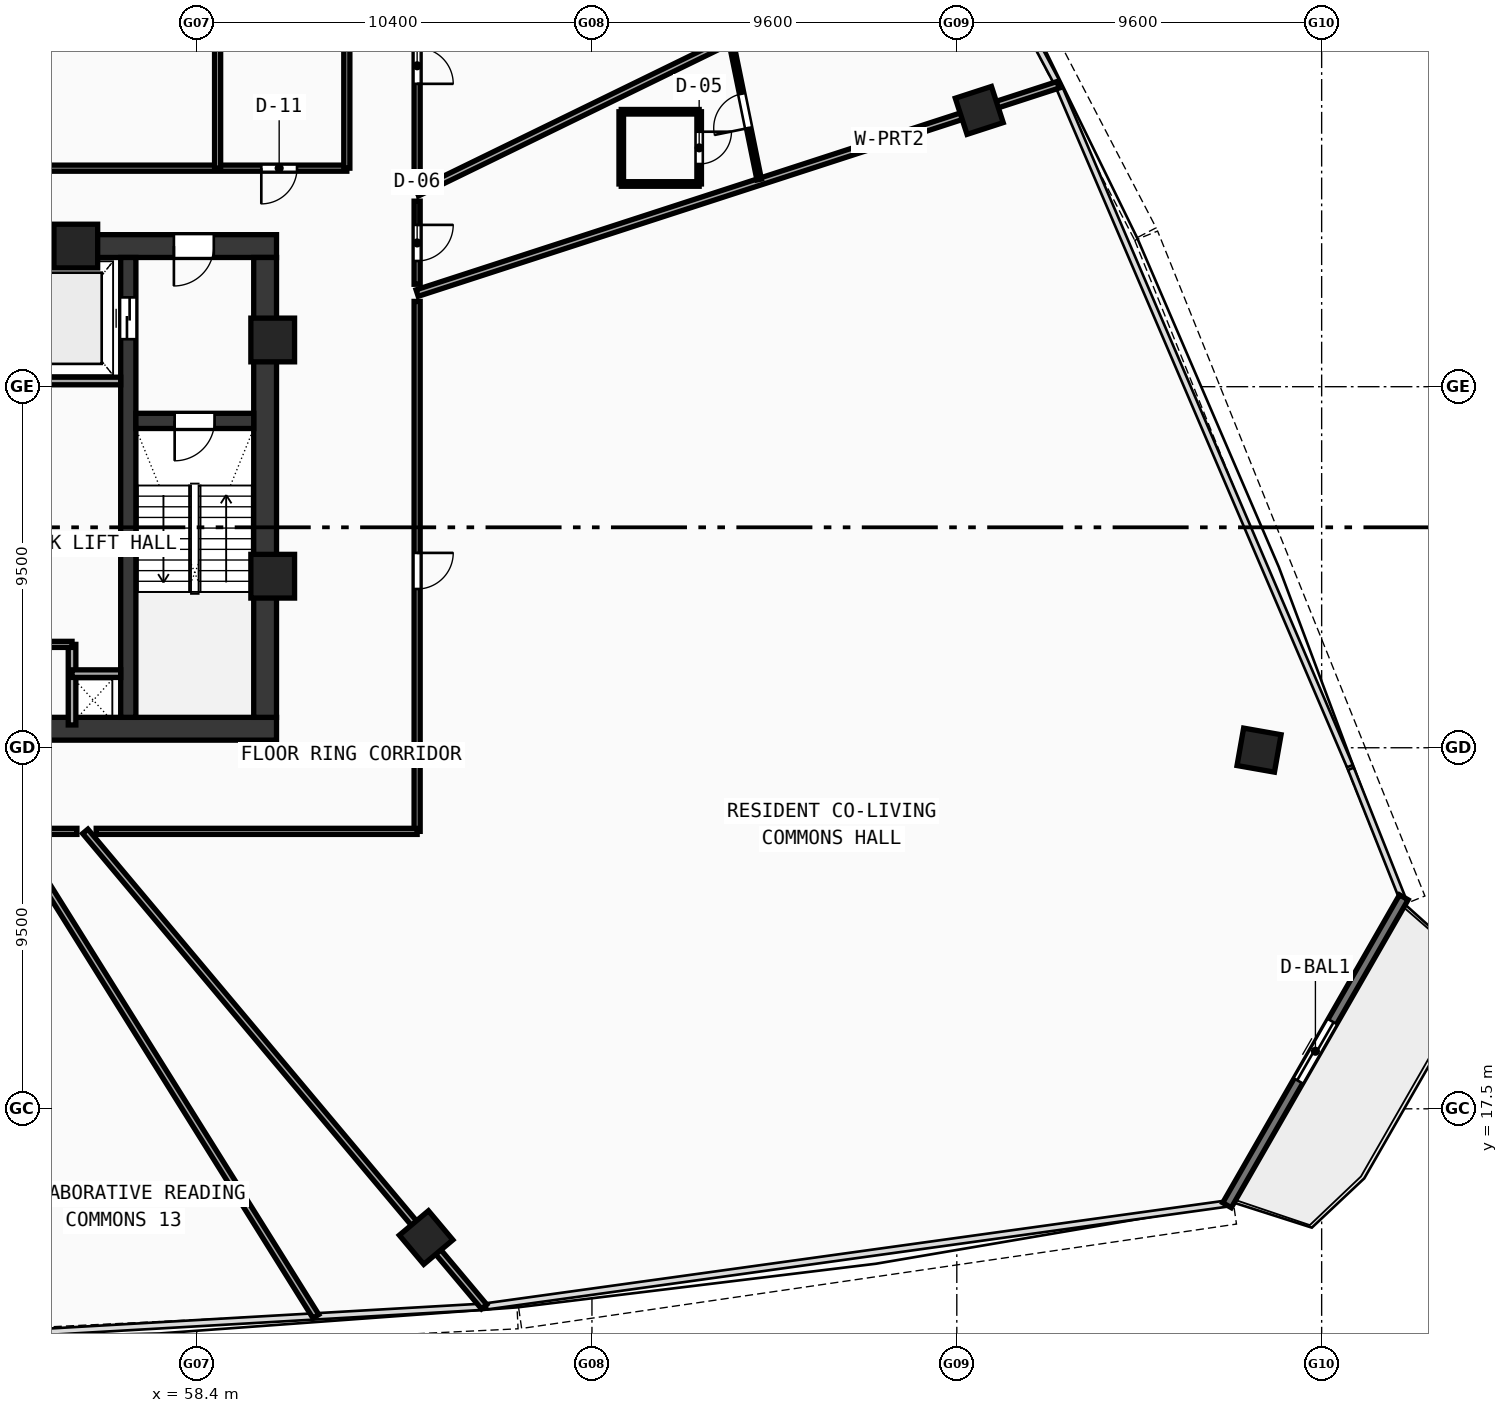
"""IFC4 building model, lengths in metres.
Left out: names, types, materials, properties, quantities, classifications, styles, units other than length and angle.
Written with IfcOpenShell. Run it as: python <this file> out.ifc"""

import sys

from ifc_helpers import new_model, si_unit, direction, frame, frame_2d, origin, origin_with_axes, origin_2d, place, context, subcontext, project, spatial, rectangle, hollow_rectangle, extrude, source, transform, mapped, element, fill, save


model = new_model("IFC4")
c1 = context("Model", 3, precision=1e-05, world=origin(), true_north=direction((0.0, 1.0)))
c2 = subcontext(c1, "Body", "Model", "MODEL_VIEW")
j1 = project(units=[si_unit("LENGTHUNIT", "METRE"), si_unit("PLANEANGLEUNIT", "RADIAN")], contexts=[c1])
p1 = place(None, origin())
s1 = spatial("IfcSite", under=j1, at=p1, CompositionType="ELEMENT")
p2 = place(p1, origin())
s2 = spatial("IfcBuilding", under=s1, at=p2, CompositionType="ELEMENT")
p3 = place(p2, frame((0.0, 0.0, 84.98)))
s3 = spatial("IfcBuildingStorey", under=s2, at=p3, CompositionType="ELEMENT", Elevation=84.98)
p4 = place(p3, frame((35.5, 27.5, 0.0), z_axis=(0.0, 0.0, 1.0), x_axis=(1.0, 0.0, 0.0)))
e1 = element("IfcWall", 1, at=p4, inside=s3, PredefinedType="SHEAR", context=c2, shape_type="SweptSolid", body=[
    extrude(rectangle(XDim=25.0, YDim=0.6, at=frame_2d((12.5, 0.0))), origin(), (0.0, 0.0, 1.0), 3.54),
])
p5 = place(p3, frame((49.2, 40.2, 0.0), z_axis=(0.0, 0.0, 1.0), x_axis=(1.0, 0.0, 0.0)))
e2 = element("IfcWall", 2, at=p5, inside=s3, PredefinedType="SHEAR", context=c2, shape_type="SweptSolid", body=[
    extrude(rectangle(XDim=11.3, YDim=0.6, at=frame_2d((5.65, 0.0))), origin(), (0.0, 0.0, 1.0), 3.54),
])
p6 = place(p5, frame((8.6, 0.0, 0.0)))
e3 = element("IfcOpeningElement", 3, at=p6, cuts=e2, PredefinedType="OPENING", context=c2, shape_type="SweptSolid", body=[
    extrude(rectangle(XDim=1.05, YDim=2.1, at=frame_2d((0.525, 1.05))), frame((0.0, 0.31, 0.0), z_axis=(0.0, -1.0, 0.0), x_axis=(1.0, 0.0, 0.0)), (0.0, 0.0, 1.0), 0.62),
])
p7 = place(p3, frame((60.2, 27.8, 0.0), z_axis=(0.0, 0.0, 1.0), x_axis=(0.0, 1.0, 0.0)))
e4 = element("IfcWall", 4, at=p7, inside=s3, PredefinedType="SHEAR", context=c2, shape_type="SweptSolid", body=[
    extrude(rectangle(XDim=12.1, YDim=0.6, at=frame_2d((6.05, 0.0))), origin(), (0.0, 0.0, 1.0), 3.54),
])
p8 = place(p3, frame((56.6, 27.8, 0.0), z_axis=(0.0, 0.0, 1.0), x_axis=(0.0, 1.0, 0.0)))
e5 = element("IfcWall", 5, at=p8, inside=s3, PredefinedType="SHEAR", context=c2, shape_type="SweptSolid", body=[
    extrude(rectangle(XDim=12.1, YDim=0.4, at=frame_2d((6.05, 0.0))), origin(), (0.0, 0.0, 1.0), 3.54),
])
p9 = place(p8, frame((9.95, 0.0, 0.0)))
e6 = element("IfcOpeningElement", 6, at=p9, cuts=e5, PredefinedType="OPENING", context=c2, shape_type="SweptSolid", body=[
    extrude(rectangle(XDim=1.1, YDim=2.1, at=frame_2d((0.55, 1.05))), frame((0.0, 0.21, 0.0), z_axis=(0.0, -1.0, 0.0), x_axis=(1.0, 0.0, 0.0)), (0.0, 0.0, 1.0), 0.42),
])
p10 = place(p3, frame((56.8, 35.6, 0.0), z_axis=(0.0, 0.0, 1.0), x_axis=(1.0, 0.0, 0.0)))
e7 = element("IfcWall", 7, at=p10, inside=s3, PredefinedType="SHEAR", context=c2, shape_type="SweptSolid", body=[
    extrude(rectangle(XDim=3.1, YDim=0.4, at=frame_2d((1.55, 0.0))), origin(), (0.0, 0.0, 1.0), 3.54),
])
p11 = place(p10, frame((1.02, 0.0, 0.0)))
e8 = element("IfcOpeningElement", 8, at=p11, cuts=e7, PredefinedType="OPENING", context=c2, shape_type="SweptSolid", body=[
    extrude(rectangle(XDim=1.05, YDim=2.1, at=frame_2d((0.525, 1.05))), frame((0.0, 0.21, 0.0), z_axis=(0.0, -1.0, 0.0), x_axis=(1.0, 0.0, 0.0)), (0.0, 0.0, 1.0), 0.42),
])
m1 = source(origin(), c2, "Body", "SweptSolid", [
    extrude(hollow_rectangle(XDim=1.15, YDim=1.15, WallThickness=0.048, at=origin_2d()), origin(), (0.0, 0.0, 1.0), 3.8),
])
for number, where, z_axis, x_axis in (
    (9, (60.4, 31.513, -0.26), (0.0, 0.0, 1.0), (1.0, 0.0, 0.0)),
    (10, (60.4, 37.729, -0.26), (0.0, 0.0, 1.0), (1.0, 0.0, 0.0)),
    (11, (55.219, 40.2, -0.26), (0.0, 0.0, 1.0), (1.0, 0.0, 0.0)),
):
    element("IfcColumn", number, at=place(p3, frame(where, z_axis=z_axis, x_axis=x_axis)), inside=s3, PredefinedType="COLUMN", context=c2, shape_type="MappedRepresentation", body=[
        mapped(m1, transform((0.0, 0.0, 0.0), scale=1.0)),
    ])
m2 = source(origin(), c2, "Body", "SweptSolid", [
    extrude(hollow_rectangle(XDim=1.0, YDim=1.0, WallThickness=0.042, at=origin_2d()), origin(), (0.0, 0.0, 1.0), 3.8),
])
for number, where, z_axis, x_axis in (
    (12, (64.436, 14.112, -0.26), (0.0, 0.0, 1.0), (0.766, 0.643, 0.0)),
    (13, (86.353, 26.938, -0.26), (0.0, 0.0, 1.0), (0.174, 0.985, 0.0)),
    (14, (78.991, 43.77, -0.26), (0.0, 0.0, 1.0), (-0.309, 0.951, 0.0)),
):
    element("IfcColumn", number, at=place(p3, frame(where, z_axis=z_axis, x_axis=x_axis)), inside=s3, PredefinedType="COLUMN", context=c2, shape_type="MappedRepresentation", body=[
        mapped(m2, transform((0.0, 0.0, 0.0), scale=1.0)),
    ])
p12 = place(p3, frame((85.51, 14.963, 0.0), z_axis=(0.0, 0.0, 1.0), x_axis=(0.497922114025, 0.867221752705, 0.0)))
e15 = element("IfcWall", 15, at=p12, inside=s3, PredefinedType="STANDARD", context=c2, shape_type="SweptSolid", body=[
    extrude(rectangle(XDim=9.343, YDim=0.26, at=frame_2d((4.671, 0.0))), origin(), (0.0, 0.0, 1.0), 3.54),
])
p13 = place(p12, frame((3.771, 0.0, 0.0)))
e16 = element("IfcOpeningElement", 16, at=p13, cuts=e15, PredefinedType="OPENING", context=c2, shape_type="SweptSolid", body=[
    extrude(rectangle(XDim=1.8, YDim=2.15, at=frame_2d((0.9, 1.075))), frame((0.0, 0.14, 0.0), z_axis=(0.0, -1.0, 0.0), x_axis=(1.0, 0.0, 0.0)), (0.0, 0.0, 1.0), 0.28),
])
p14 = place(p3, frame((53.68, 36.65, 0.0), z_axis=(0.0, 0.0, 1.0), x_axis=(1.0, 0.0, 0.0)))
e17 = element("IfcWall", 17, at=p14, inside=s3, PredefinedType="SOLIDWALL", context=c2, shape_type="SweptSolid", body=[
    extrude(rectangle(XDim=2.72, YDim=0.2, at=frame_2d((1.36, 0.0))), origin(), (0.0, 0.0, 1.0), 3.54),
])
p15 = place(p3, frame((55.12, 27.6, 0.0), z_axis=(0.0, 0.0, 1.0), x_axis=(0.0, 1.0, 0.0)))
e18 = element("IfcWall", 18, at=p15, inside=s3, PredefinedType="SOLIDWALL", context=c2, shape_type="SweptSolid", body=[
    extrude(rectangle(XDim=2.12, YDim=0.2, at=frame_2d((1.06, 0.0))), origin(), (0.0, 0.0, 1.0), 3.54),
])
p16 = place(p3, frame((55.12, 28.95, 0.0), z_axis=(0.0, 0.0, 1.0), x_axis=(1.0, 0.0, 0.0)))
e19 = element("IfcWall", 19, at=p16, inside=s3, PredefinedType="SOLIDWALL", context=c2, shape_type="SweptSolid", body=[
    extrude(rectangle(XDim=1.28, YDim=0.2, at=frame_2d((0.64, 0.0))), origin(), (0.0, 0.0, 1.0), 3.54),
])
p17 = place(p3, frame((51.05, 29.72, 0.0), z_axis=(0.0, 0.0, 1.0), x_axis=(1.0, 0.0, 0.0)))
e20 = element("IfcWall", 20, at=p17, inside=s3, PredefinedType="PARTITIONING", context=c2, shape_type="SweptSolid", body=[
    extrude(rectangle(XDim=4.07, YDim=0.16, at=frame_2d((2.035, 0.0))), origin(), (0.0, 0.0, 1.0), 3.54),
])
p18 = place(p17, frame((0.5, 0.0, 0.0)))
e21 = element("IfcOpeningElement", 21, at=p18, cuts=e20, PredefinedType="OPENING", context=c2, shape_type="SweptSolid", body=[
    extrude(rectangle(XDim=0.9, YDim=2.1, at=frame_2d((0.45, 1.05))), frame((0.0, 0.09, 0.0), z_axis=(0.0, -1.0, 0.0), x_axis=(1.0, 0.0, 0.0)), (0.0, 0.0, 1.0), 0.18),
])
p19 = place(p3, frame((45.92, 42.25, 0.0), z_axis=(0.0, 0.0, 1.0), x_axis=(1.0, 0.0, 0.0)))
e22 = element("IfcWall", 22, at=p19, inside=s3, PredefinedType="PARTITIONING", context=c2, shape_type="SweptSolid", body=[
    extrude(rectangle(XDim=16.43, YDim=0.16, at=frame_2d((8.215, 0.0))), origin(), (0.0, 0.0, 1.0), 2.84),
])
p20 = place(p19, frame((2.1, 0.0, 0.0)))
e23 = element("IfcOpeningElement", 23, at=p20, cuts=e22, PredefinedType="OPENING", context=c2, shape_type="SweptSolid", body=[
    extrude(rectangle(XDim=0.92, YDim=2.1, at=frame_2d((0.46, 1.05))), frame((0.0, 0.09, 0.0), z_axis=(0.0, -1.0, 0.0), x_axis=(1.0, 0.0, 0.0)), (0.0, 0.0, 1.0), 0.18),
])
p21 = place(p19, frame((14.18, 0.0, 0.0)))
e24 = element("IfcOpeningElement", 24, at=p21, cuts=e22, PredefinedType="OPENING", context=c2, shape_type="SweptSolid", body=[
    extrude(rectangle(XDim=0.94, YDim=2.1, at=frame_2d((0.47, 1.05))), frame((0.0, 0.09, 0.0), z_axis=(0.0, -1.0, 0.0), x_axis=(1.0, 0.0, 0.0)), (0.0, 0.0, 1.0), 0.18),
])
p22 = place(p3, frame((62.35, 42.25, 0.0), z_axis=(0.0, 0.0, 1.0), x_axis=(0.0, 1.0, 0.0)))
e25 = element("IfcWall", 25, at=p22, inside=s3, PredefinedType="PARTITIONING", context=c2, shape_type="SweptSolid", body=[
    extrude(rectangle(XDim=7.55, YDim=0.16, at=frame_2d((3.775, 0.0))), origin(), (0.0, 0.0, 1.0), 2.84),
])
p23 = place(p3, frame((58.95, 42.25, 0.0), z_axis=(0.0, 0.0, 1.0), x_axis=(0.0, 1.0, 0.0)))
e26 = element("IfcWall", 26, at=p23, inside=s3, PredefinedType="PARTITIONING", context=c2, shape_type="SweptSolid", body=[
    extrude(rectangle(XDim=4.35, YDim=0.16, at=frame_2d((2.175, 0.0))), origin(), (0.0, 0.0, 1.0), 2.84),
])
p24 = place(p3, frame((64.2, 38.964, 0.0), z_axis=(0.0, 0.0, 1.0), x_axis=(0.951054301474, 0.309023810812, 0.0)))
e27 = element("IfcWall", 27, at=p24, inside=s3, PredefinedType="PARTITIONING", context=c2, shape_type="SweptSolid", body=[
    extrude(rectangle(XDim=17.733, YDim=0.18, at=frame_2d((8.867, 0.0))), origin(), (0.0, 0.0, 1.0), 2.84),
])
p25 = place(p3, frame((64.2, 41.601, 0.0), z_axis=(0.0, 0.0, 1.0), x_axis=(0.898796049991, 0.438367038588, 0.0)))
e28 = element("IfcWall", 28, at=p25, inside=s3, PredefinedType="PARTITIONING", context=c2, shape_type="SweptSolid", body=[
    extrude(rectangle(XDim=16.234, YDim=0.18, at=frame_2d((8.117, 0.0))), origin(), (0.0, 0.0, 1.0), 2.84),
])
p26 = place(p3, frame((53.561, 24.8, 0.0), z_axis=(0.0, 0.0, 1.0), x_axis=(0.529927477017, -0.848042964184, 0.0)))
e29 = element("IfcWall", 29, at=p26, inside=s3, PredefinedType="PARTITIONING", context=c2, shape_type="SweptSolid", body=[
    extrude(rectangle(XDim=15.048, YDim=0.18, at=frame_2d((7.524, 0.0))), origin(), (0.0, 0.0, 1.0), 2.84),
])
p27 = place(p3, frame((55.468, 24.8, 0.0), z_axis=(0.0, 0.0, 1.0), x_axis=(0.642790086939, -0.76604236445, 0.0)))
e30 = element("IfcWall", 30, at=p27, inside=s3, PredefinedType="PARTITIONING", context=c2, shape_type="SweptSolid", body=[
    extrude(rectangle(XDim=16.326, YDim=0.18, at=frame_2d((8.163, 0.0))), origin(), (0.0, 0.0, 1.0), 2.84),
])
p28 = place(p3, frame((64.2, 48.067, 0.0), z_axis=(0.0, 0.0, 1.0), x_axis=(0.0, -1.0, 0.0)))
e31 = element("IfcWall", 31, at=p28, inside=s3, PredefinedType="PARTITIONING", context=c2, shape_type="SweptSolid", body=[
    extrude(rectangle(XDim=6.221, YDim=0.16, at=frame_2d((3.11, 0.0))), origin(), (0.0, 0.0, 1.0), 2.84),
])
p29 = place(p28, frame((2.648, 0.0, 0.0)))
e32 = element("IfcOpeningElement", 32, at=p29, cuts=e31, PredefinedType="OPENING", context=c2, shape_type="SweptSolid", body=[
    extrude(rectangle(XDim=0.95, YDim=2.1, at=frame_2d((0.475, 1.05))), frame((0.0, 0.09, 0.0), z_axis=(0.0, -1.0, 0.0), x_axis=(1.0, 0.0, 0.0)), (0.0, 0.0, 1.0), 0.18),
])
p30 = place(p3, frame((64.2, 41.382, 0.0), z_axis=(0.0, 0.0, 1.0), x_axis=(0.0, -1.0, 0.0)))
e33 = element("IfcWall", 33, at=p30, inside=s3, PredefinedType="PARTITIONING", context=c2, shape_type="SweptSolid", body=[
    extrude(rectangle(XDim=2.187, YDim=0.16, at=frame_2d((1.093, 0.0))), origin(), (0.0, 0.0, 1.0), 3.54),
])
p31 = place(p30, frame((0.624, 0.0, 0.0)))
e34 = element("IfcOpeningElement", 34, at=p31, cuts=e33, PredefinedType="OPENING", context=c2, shape_type="SweptSolid", body=[
    extrude(rectangle(XDim=0.95, YDim=2.1, at=frame_2d((0.475, 1.05))), frame((0.0, 0.09, 0.0), z_axis=(0.0, -1.0, 0.0), x_axis=(1.0, 0.0, 0.0)), (0.0, 0.0, 1.0), 0.18),
])
p32 = place(p3, frame((64.2, 38.744, 0.0), z_axis=(0.0, 0.0, 1.0), x_axis=(0.0, -1.0, 0.0)))
e35 = element("IfcWall", 35, at=p32, inside=s3, PredefinedType="PARTITIONING", context=c2, shape_type="SweptSolid", body=[
    extrude(rectangle(XDim=13.944, YDim=0.16, at=frame_2d((6.972, 0.0))), origin(), (0.0, 0.0, 1.0), 2.84),
])
p33 = place(p32, frame((6.617, 0.0, 0.0)))
e36 = element("IfcOpeningElement", 36, at=p33, cuts=e35, PredefinedType="OPENING", context=c2, shape_type="SweptSolid", body=[
    extrude(rectangle(XDim=0.95, YDim=2.1, at=frame_2d((0.475, 1.05))), frame((0.0, 0.09, 0.0), z_axis=(0.0, -1.0, 0.0), x_axis=(1.0, 0.0, 0.0)), (0.0, 0.0, 1.0), 0.18),
])
p34 = place(p3, frame((64.2, 24.8, 0.0), z_axis=(0.0, 0.0, 1.0), x_axis=(-1.0, 0.0, 0.0)))
e37 = element("IfcWall", 37, at=p34, inside=s3, PredefinedType="PARTITIONING", context=c2, shape_type="SweptSolid", body=[
    extrude(rectangle(XDim=8.445, YDim=0.16, at=frame_2d((4.222, 0.0))), origin(), (0.0, 0.0, 1.0), 3.14),
])
p35 = place(p3, frame((55.248, 24.8, 0.0), z_axis=(0.0, 0.0, 1.0), x_axis=(-1.0, 0.0, 0.0)))
e38 = element("IfcWall", 38, at=p35, inside=s3, PredefinedType="PARTITIONING", context=c2, shape_type="SweptSolid", body=[
    extrude(rectangle(XDim=1.427, YDim=0.16, at=frame_2d((0.714, 0.0))), origin(), (0.0, 0.0, 1.0), 2.84),
])
p36 = place(p3, frame((69.571, 41.834, 0.0), z_axis=(0.0, 0.0, 1.0), x_axis=(1.0, 0.0, 0.0)))
e39 = element("IfcWall", 39, at=p36, inside=s3, PredefinedType="PARTITIONING", context=c2, shape_type="SweptSolid", body=[
    extrude(rectangle(XDim=2.05, YDim=0.12, at=frame_2d((1.025, 0.0))), origin(), (0.0, 0.0, 1.0), 3.54),
])
p37 = place(p3, frame((71.621, 41.834, 0.0), z_axis=(0.0, 0.0, 1.0), x_axis=(0.0, 1.0, 0.0)))
e40 = element("IfcWall", 40, at=p37, inside=s3, PredefinedType="PARTITIONING", context=c2, shape_type="SweptSolid", body=[
    extrude(rectangle(XDim=1.9, YDim=0.12, at=frame_2d((0.95, 0.0))), origin(), (0.0, 0.0, 1.0), 3.14),
])
p38 = place(p37, frame((0.525, 0.0, 0.0)))
e41 = element("IfcOpeningElement", 41, at=p38, cuts=e40, PredefinedType="OPENING", context=c2, shape_type="SweptSolid", body=[
    extrude(rectangle(XDim=0.85, YDim=2.1, at=frame_2d((0.425, 1.05))), frame((0.0, 0.07, 0.0), z_axis=(0.0, -1.0, 0.0), x_axis=(1.0, 0.0, 0.0)), (0.0, 0.0, 1.0), 0.14),
])
p39 = place(p3, frame((71.621, 43.734, 0.0), z_axis=(0.0, 0.0, 1.0), x_axis=(-1.0, 0.0, 0.0)))
e42 = element("IfcWall", 42, at=p39, inside=s3, PredefinedType="PARTITIONING", context=c2, shape_type="SweptSolid", body=[
    extrude(rectangle(XDim=2.05, YDim=0.12, at=frame_2d((1.025, 0.0))), origin(), (0.0, 0.0, 1.0), 3.54),
])
p40 = place(p3, frame((69.571, 43.734, 0.0), z_axis=(0.0, 0.0, 1.0), x_axis=(0.0, -1.0, 0.0)))
e43 = element("IfcWall", 43, at=p40, inside=s3, PredefinedType="PARTITIONING", context=c2, shape_type="SweptSolid", body=[
    extrude(rectangle(XDim=1.9, YDim=0.12, at=frame_2d((0.95, 0.0))), origin(), (0.0, 0.0, 1.0), 3.54),
])
p41 = place(p3, frame((73.2, 41.951, 0.0), z_axis=(0.0, 0.0, 1.0), x_axis=(-0.199717476268, 0.979853524601, 0.0)))
e44 = element("IfcWall", 44, at=p41, inside=s3, PredefinedType="PARTITIONING", context=c2, shape_type="SweptSolid", body=[
    extrude(rectangle(XDim=3.688, YDim=0.12, at=frame_2d((1.844, 0.0))), origin(), (0.0, 0.0, 1.0), 2.84),
])
p42 = place(p41, frame((1.384, 0.0, 0.0)))
e45 = element("IfcOpeningElement", 45, at=p42, cuts=e44, PredefinedType="OPENING", context=c2, shape_type="SweptSolid", body=[
    extrude(rectangle(XDim=0.92, YDim=2.1, at=frame_2d((0.46, 1.05))), frame((0.0, 0.07, 0.0), z_axis=(0.0, -1.0, 0.0), x_axis=(1.0, 0.0, 0.0)), (0.0, 0.0, 1.0), 0.14),
])
m3 = source(origin(), c2, "Body", "SweptSolid", [
    extrude(rectangle(XDim=1.8, YDim=2.15, at=frame_2d((0.9, 1.075))), frame((0.0, 0.025, 0.0), z_axis=(0.0, -1.0, 0.0), x_axis=(1.0, 0.0, 0.0)), (0.0, 0.0, 1.0), 0.05),
])
p43 = place(p13, origin_with_axes())
e46 = element("IfcDoor", 46, at=p43, inside=s3, OperationType="DOUBLE_DOOR_SLIDING", PredefinedType="DOOR", context=c2, shape_type="MappedRepresentation", body=[
    mapped(m3, transform((0.0, 0.0, 0.0), scale=1.0)),
])
fill(e16, e46)
m4 = source(origin(), c2, "Body", "SweptSolid", [
    extrude(rectangle(XDim=1.05, YDim=2.1, at=frame_2d((0.525, 1.05))), frame((0.0, 0.025, 0.0), z_axis=(0.0, -1.0, 0.0), x_axis=(1.0, 0.0, 0.0)), (0.0, 0.0, 1.0), 0.05),
])
p44 = place(p11, frame((1.05, 0.0, 0.0), z_axis=(0.0, 0.0, 1.0), x_axis=(-1.0, 0.0, 0.0)))
e47 = element("IfcDoor", 47, at=p44, inside=s3, OperationType="SINGLE_SWING_RIGHT", PredefinedType="DOOR", context=c2, shape_type="MappedRepresentation", body=[
    mapped(m4, transform((0.0, 0.0, 0.0), scale=1.0)),
])
fill(e8, e47)
p45 = place(p6, frame((1.05, 0.0, 0.0), z_axis=(0.0, 0.0, 1.0), x_axis=(-1.0, 0.0, 0.0)))
e48 = element("IfcDoor", 48, at=p45, inside=s3, OperationType="SINGLE_SWING_RIGHT", PredefinedType="DOOR", context=c2, shape_type="MappedRepresentation", body=[
    mapped(m4, transform((0.0, 0.0, 0.0), scale=1.0)),
])
fill(e3, e48)
m5 = source(origin(), c2, "Body", "SweptSolid", [
    extrude(rectangle(XDim=1.1, YDim=2.1, at=frame_2d((0.55, 1.05))), frame((0.0, 0.025, 0.0), z_axis=(0.0, -1.0, 0.0), x_axis=(1.0, 0.0, 0.0)), (0.0, 0.0, 1.0), 0.05),
])
p46 = place(p9, origin_with_axes())
e49 = element("IfcDoor", 49, at=p46, inside=s3, OperationType="DOUBLE_DOOR_SLIDING", PredefinedType="DOOR", context=c2, shape_type="MappedRepresentation", body=[
    mapped(m5, transform((0.0, 0.0, 0.0), scale=1.0)),
])
fill(e6, e49)
m6 = source(origin(), c2, "Body", "SweptSolid", [
    extrude(rectangle(XDim=0.94, YDim=2.1, at=frame_2d((0.47, 1.05))), frame((0.0, 0.025, 0.0), z_axis=(0.0, -1.0, 0.0), x_axis=(1.0, 0.0, 0.0)), (0.0, 0.0, 1.0), 0.05),
])
p47 = place(p21, frame((0.94, 0.0, 0.0), z_axis=(0.0, 0.0, 1.0), x_axis=(-1.0, 0.0, 0.0)))
e50 = element("IfcDoor", 50, at=p47, inside=s3, OperationType="SINGLE_SWING_RIGHT", PredefinedType="DOOR", context=c2, shape_type="MappedRepresentation", body=[
    mapped(m6, transform((0.0, 0.0, 0.0), scale=1.0)),
])
fill(e24, e50)
m7 = source(origin(), c2, "Body", "SweptSolid", [
    extrude(rectangle(XDim=0.95, YDim=2.1, at=frame_2d((0.475, 1.05))), frame((0.0, 0.025, 0.0), z_axis=(0.0, -1.0, 0.0), x_axis=(1.0, 0.0, 0.0)), (0.0, 0.0, 1.0), 0.05),
])
p48 = place(p31, origin_with_axes())
e51 = element("IfcDoor", 51, at=p48, inside=s3, OperationType="SINGLE_SWING_LEFT", PredefinedType="DOOR", context=c2, shape_type="MappedRepresentation", body=[
    mapped(m7, transform((0.0, 0.0, 0.0), scale=1.0)),
])
fill(e34, e51)
m8 = source(origin(), c2, "Body", "SweptSolid", [
    extrude(rectangle(XDim=0.85, YDim=2.1, at=frame_2d((0.425, 1.05))), frame((0.0, 0.025, 0.0), z_axis=(0.0, -1.0, 0.0), x_axis=(1.0, 0.0, 0.0)), (0.0, 0.0, 1.0), 0.05),
])
p49 = place(p38, frame((0.85, 0.0, 0.0), z_axis=(0.0, 0.0, 1.0), x_axis=(-1.0, 0.0, 0.0)))
e52 = element("IfcDoor", 52, at=p49, inside=s3, OperationType="SINGLE_SWING_LEFT", PredefinedType="DOOR", context=c2, shape_type="MappedRepresentation", body=[
    mapped(m8, transform((0.0, 0.0, 0.0), scale=1.0)),
])
fill(e41, e52)
m9 = source(origin(), c2, "Body", "SweptSolid", [
    extrude(rectangle(XDim=0.92, YDim=2.1, at=frame_2d((0.46, 1.05))), frame((0.0, 0.025, 0.0), z_axis=(0.0, -1.0, 0.0), x_axis=(1.0, 0.0, 0.0)), (0.0, 0.0, 1.0), 0.05),
])
p50 = place(p42, origin_with_axes())
e53 = element("IfcDoor", 53, at=p50, inside=s3, OperationType="SINGLE_SWING_LEFT", PredefinedType="DOOR", context=c2, shape_type="MappedRepresentation", body=[
    mapped(m9, transform((0.0, 0.0, 0.0), scale=1.0)),
])
fill(e45, e53)
p51 = place(p29, origin_with_axes())
e54 = element("IfcDoor", 54, at=p51, inside=s3, OperationType="SINGLE_SWING_RIGHT", PredefinedType="DOOR", context=c2, shape_type="MappedRepresentation", body=[
    mapped(m7, transform((0.0, 0.0, 0.0), scale=1.0)),
])
fill(e32, e54)
p52 = place(p33, origin_with_axes())
e55 = element("IfcDoor", 55, at=p52, inside=s3, OperationType="SINGLE_SWING_LEFT", PredefinedType="DOOR", context=c2, shape_type="MappedRepresentation", body=[
    mapped(m7, transform((0.0, 0.0, 0.0), scale=1.0)),
])
fill(e36, e55)
save(model, sys.argv[1])
